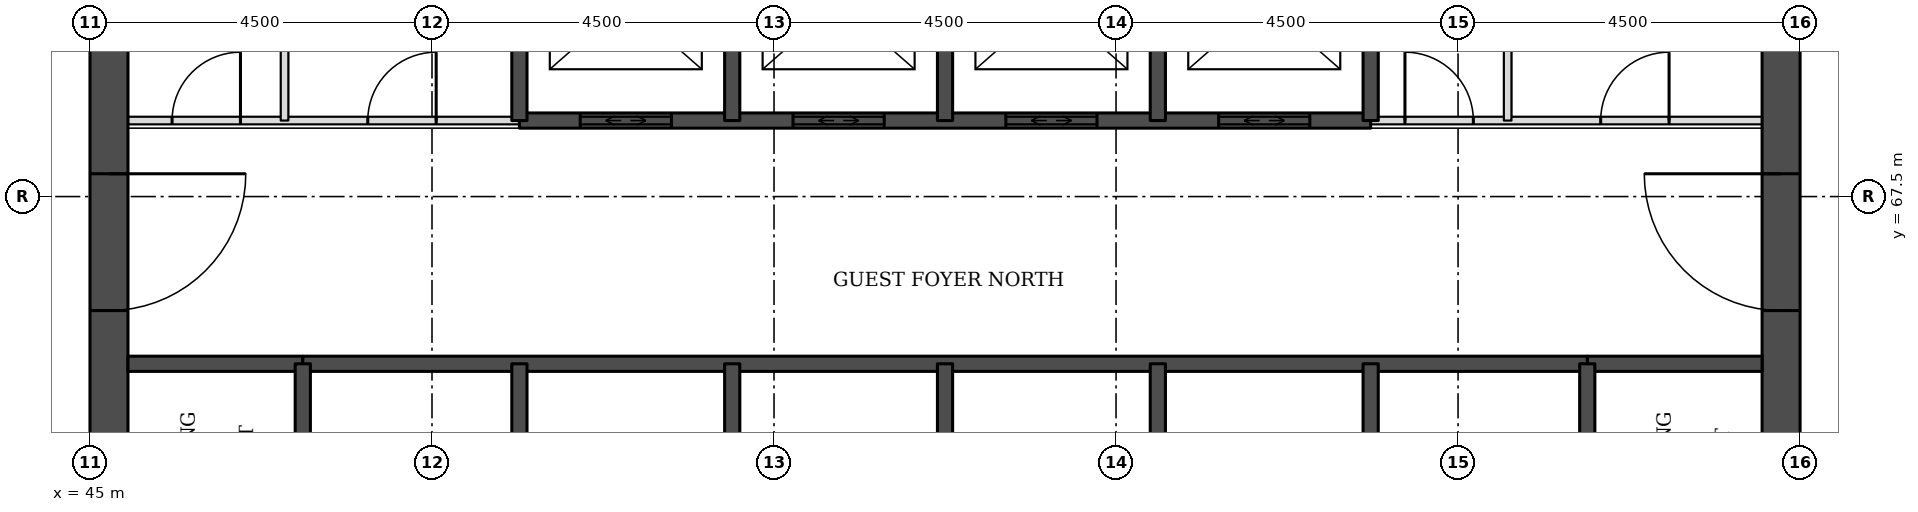
"""IFC4 building model, lengths in metres.
Left out: names, types, materials, properties, quantities, classifications, styles, units other than length and angle.
Written with IfcOpenShell. Run it as: python <this file> out.ifc"""

import sys

from ifc_helpers import new_model, si_unit, direction, frame, frame_2d, origin, place, context, subcontext, project, spatial, rectangle, extrude, element, fill, save


model = new_model("IFC4")
c1 = context("Model", 3, precision=1e-05, world=origin(), true_north=direction((0.0, 1.0)))
c2 = subcontext(c1, "Body", "Model", "MODEL_VIEW")
j1 = project(units=[si_unit("LENGTHUNIT", "METRE"), si_unit("PLANEANGLEUNIT", "RADIAN")], contexts=[c1])
p1 = place(None, origin())
s1 = spatial("IfcSite", under=j1, at=p1, CompositionType="ELEMENT")
p2 = place(p1, origin())
s2 = spatial("IfcBuilding", under=s1, at=p2, CompositionType="ELEMENT")
p3 = place(p2, frame((0.0, 0.0, 36.3)))
s3 = spatial("IfcBuildingStorey", under=s2, at=p3, CompositionType="ELEMENT", Elevation=36.3)
p4 = place(p3, frame((45.25, 49.5, 0.0), z_axis=(0.0, 0.0, 1.0), x_axis=(0.0, 1.0, 0.0)))
e1 = element("IfcWall", 1, at=p4, inside=s3, PredefinedType="SHEAR", context=c2, shape_type="SweptSolid", body=[
    extrude(rectangle(XDim=22.5, YDim=0.5, at=frame_2d((11.25, 0.0))), origin(), (0.0, 0.0, 1.0), 3.3),
])
p5 = place(p4, frame((4.2, 0.0, 0.0)))
e2 = element("IfcOpeningElement", 2, at=p5, cuts=e1, PredefinedType="OPENING", context=c2, shape_type="SweptSolid", body=[
    extrude(rectangle(XDim=1.8, YDim=2.1, at=frame_2d((0.9, 1.05))), frame((0.0, 0.26, 0.0), z_axis=(0.0, -1.0, 0.0), x_axis=(1.0, 0.0, 0.0)), (0.0, 0.0, 1.0), 0.52),
])
p6 = place(p4, frame((6.9, 0.0, 0.0)))
e3 = element("IfcOpeningElement", 3, at=p6, cuts=e1, PredefinedType="OPENING", context=c2, shape_type="SweptSolid", body=[
    extrude(rectangle(XDim=1.1, YDim=2.1, at=frame_2d((0.55, 1.05))), frame((0.0, 0.26, 0.0), z_axis=(0.0, -1.0, 0.0), x_axis=(1.0, 0.0, 0.0)), (0.0, 0.0, 1.0), 0.52),
])
p7 = place(p4, frame((13.6, 0.0, 0.0)))
e4 = element("IfcOpeningElement", 4, at=p7, cuts=e1, PredefinedType="OPENING", context=c2, shape_type="SweptSolid", body=[
    extrude(rectangle(XDim=1.1, YDim=2.1, at=frame_2d((0.55, 1.05))), frame((0.0, 0.26, 0.0), z_axis=(0.0, -1.0, 0.0), x_axis=(1.0, 0.0, 0.0)), (0.0, 0.0, 1.0), 0.52),
])
p8 = place(p4, frame((16.5, 0.0, 0.0)))
e5 = element("IfcOpeningElement", 5, at=p8, cuts=e1, PredefinedType="OPENING", context=c2, shape_type="SweptSolid", body=[
    extrude(rectangle(XDim=1.8, YDim=2.1, at=frame_2d((0.9, 1.05))), frame((0.0, 0.26, 0.0), z_axis=(0.0, -1.0, 0.0), x_axis=(1.0, 0.0, 0.0)), (0.0, 0.0, 1.0), 0.52),
])
p9 = place(p3, frame((67.25, 49.5, 0.0), z_axis=(0.0, 0.0, 1.0), x_axis=(0.0, 1.0, 0.0)))
e6 = element("IfcWall", 6, at=p9, inside=s3, PredefinedType="SHEAR", context=c2, shape_type="SweptSolid", body=[
    extrude(rectangle(XDim=22.5, YDim=0.5, at=frame_2d((11.25, 0.0))), origin(), (0.0, 0.0, 1.0), 3.3),
])
p10 = place(p9, frame((4.2, 0.0, 0.0)))
e7 = element("IfcOpeningElement", 7, at=p10, cuts=e6, PredefinedType="OPENING", context=c2, shape_type="SweptSolid", body=[
    extrude(rectangle(XDim=1.8, YDim=2.1, at=frame_2d((0.9, 1.05))), frame((0.0, 0.26, 0.0), z_axis=(0.0, -1.0, 0.0), x_axis=(1.0, 0.0, 0.0)), (0.0, 0.0, 1.0), 0.52),
])
p11 = place(p9, frame((6.9, 0.0, 0.0)))
e8 = element("IfcOpeningElement", 8, at=p11, cuts=e6, PredefinedType="OPENING", context=c2, shape_type="SweptSolid", body=[
    extrude(rectangle(XDim=1.1, YDim=2.1, at=frame_2d((0.55, 1.05))), frame((0.0, 0.26, 0.0), z_axis=(0.0, -1.0, 0.0), x_axis=(1.0, 0.0, 0.0)), (0.0, 0.0, 1.0), 0.52),
])
p12 = place(p9, frame((13.6, 0.0, 0.0)))
e9 = element("IfcOpeningElement", 9, at=p12, cuts=e6, PredefinedType="OPENING", context=c2, shape_type="SweptSolid", body=[
    extrude(rectangle(XDim=1.1, YDim=2.1, at=frame_2d((0.55, 1.05))), frame((0.0, 0.26, 0.0), z_axis=(0.0, -1.0, 0.0), x_axis=(1.0, 0.0, 0.0)), (0.0, 0.0, 1.0), 0.52),
])
p13 = place(p9, frame((16.5, 0.0, 0.0)))
e10 = element("IfcOpeningElement", 10, at=p13, cuts=e6, PredefinedType="OPENING", context=c2, shape_type="SweptSolid", body=[
    extrude(rectangle(XDim=1.8, YDim=2.1, at=frame_2d((0.9, 1.05))), frame((0.0, 0.26, 0.0), z_axis=(0.0, -1.0, 0.0), x_axis=(1.0, 0.0, 0.0)), (0.0, 0.0, 1.0), 0.52),
])
for number, where, z_axis, x_axis in (
    (11, (45.5, 65.3, 0.0), (0.0, 0.0, 1.0), (1.0, 0.0, 0.0)),
    (12, (64.7, 65.3, 0.0), (0.0, 0.0, 1.0), (1.0, 0.0, 0.0)),
):
    element("IfcWall", number, at=place(p3, frame(where, z_axis=z_axis, x_axis=x_axis)), inside=s3, PredefinedType="SOLIDWALL", context=c2, shape_type="SweptSolid", body=[
        extrude(rectangle(XDim=2.3, YDim=0.2, at=frame_2d((1.15, 0.0))), origin(), (0.0, 0.0, 1.0), 3.08),
    ])
p14 = place(p3, frame((47.8, 65.3, 0.0), z_axis=(0.0, 0.0, 1.0), x_axis=(1.0, 0.0, 0.0)))
e13 = element("IfcWall", 13, at=p14, inside=s3, PredefinedType="SOLIDWALL", context=c2, shape_type="SweptSolid", body=[
    extrude(rectangle(XDim=16.9, YDim=0.2, at=frame_2d((8.45, 0.0))), origin(), (0.0, 0.0, 1.0), 3.08),
])
p15 = place(p3, frame((45.5, 68.5, 0.0), z_axis=(0.0, 0.0, 1.0), x_axis=(1.0, 0.0, 0.0)))
e14 = element("IfcWall", 14, at=p15, inside=s3, PredefinedType="PARTITIONING", context=c2, shape_type="SweptSolid", body=[
    extrude(rectangle(XDim=5.15, YDim=0.1, at=frame_2d((2.575, 0.0))), origin(), (0.0, 0.0, 1.0), 3.08),
])
p16 = place(p15, frame((0.58, 0.0, 0.0)))
e15 = element("IfcOpeningElement", 15, at=p16, cuts=e14, PredefinedType="OPENING", context=c2, shape_type="SweptSolid", body=[
    extrude(rectangle(XDim=0.9, YDim=2.1, at=frame_2d((0.45, 1.05))), frame((0.0, 0.06, 0.0), z_axis=(0.0, -1.0, 0.0), x_axis=(1.0, 0.0, 0.0)), (0.0, 0.0, 1.0), 0.12),
])
p17 = place(p15, frame((3.155, 0.0, 0.0)))
e16 = element("IfcOpeningElement", 16, at=p17, cuts=e14, PredefinedType="OPENING", context=c2, shape_type="SweptSolid", body=[
    extrude(rectangle(XDim=0.9, YDim=2.1, at=frame_2d((0.45, 1.05))), frame((0.0, 0.06, 0.0), z_axis=(0.0, -1.0, 0.0), x_axis=(1.0, 0.0, 0.0)), (0.0, 0.0, 1.0), 0.12),
])
p18 = place(p3, frame((61.85, 68.5, 0.0), z_axis=(0.0, 0.0, 1.0), x_axis=(1.0, 0.0, 0.0)))
e17 = element("IfcWall", 17, at=p18, inside=s3, PredefinedType="PARTITIONING", context=c2, shape_type="SweptSolid", body=[
    extrude(rectangle(XDim=5.15, YDim=0.1, at=frame_2d((2.575, 0.0))), origin(), (0.0, 0.0, 1.0), 3.08),
])
p19 = place(p18, frame((3.026, 0.0, 0.0)))
e18 = element("IfcOpeningElement", 18, at=p19, cuts=e17, PredefinedType="OPENING", context=c2, shape_type="SweptSolid", body=[
    extrude(rectangle(XDim=0.9, YDim=2.1, at=frame_2d((0.45, 1.05))), frame((0.0, 0.06, 0.0), z_axis=(0.0, -1.0, 0.0), x_axis=(1.0, 0.0, 0.0)), (0.0, 0.0, 1.0), 0.12),
])
p20 = place(p18, frame((0.451, 0.0, 0.0)))
e19 = element("IfcOpeningElement", 19, at=p20, cuts=e17, PredefinedType="OPENING", context=c2, shape_type="SweptSolid", body=[
    extrude(rectangle(XDim=0.9, YDim=2.1, at=frame_2d((0.45, 1.05))), frame((0.0, 0.06, 0.0), z_axis=(0.0, -1.0, 0.0), x_axis=(1.0, 0.0, 0.0)), (0.0, 0.0, 1.0), 0.12),
])
p21 = place(p3, frame((50.65, 68.5, 0.0), z_axis=(0.0, 0.0, 1.0), x_axis=(1.0, 0.0, 0.0)))
e20 = element("IfcWall", 20, at=p21, inside=s3, PredefinedType="SOLIDWALL", context=c2, shape_type="SweptSolid", body=[
    extrude(rectangle(XDim=11.2, YDim=0.2, at=frame_2d((5.6, 0.0))), origin(), (0.0, 0.0, 1.0), 3.08),
])
p22 = place(p21, frame((0.8, 0.0, 0.0)))
e21 = element("IfcOpeningElement", 21, at=p22, cuts=e20, PredefinedType="OPENING", context=c2, shape_type="SweptSolid", body=[
    extrude(rectangle(XDim=1.2, YDim=2.1, at=frame_2d((0.6, 1.05))), frame((0.0, 0.11, 0.0), z_axis=(0.0, -1.0, 0.0), x_axis=(1.0, 0.0, 0.0)), (0.0, 0.0, 1.0), 0.22),
])
p23 = place(p21, frame((3.6, 0.0, 0.0)))
e22 = element("IfcOpeningElement", 22, at=p23, cuts=e20, PredefinedType="OPENING", context=c2, shape_type="SweptSolid", body=[
    extrude(rectangle(XDim=1.2, YDim=2.1, at=frame_2d((0.6, 1.05))), frame((0.0, 0.11, 0.0), z_axis=(0.0, -1.0, 0.0), x_axis=(1.0, 0.0, 0.0)), (0.0, 0.0, 1.0), 0.22),
])
p24 = place(p21, frame((6.4, 0.0, 0.0)))
e23 = element("IfcOpeningElement", 23, at=p24, cuts=e20, PredefinedType="OPENING", context=c2, shape_type="SweptSolid", body=[
    extrude(rectangle(XDim=1.2, YDim=2.1, at=frame_2d((0.6, 1.05))), frame((0.0, 0.11, 0.0), z_axis=(0.0, -1.0, 0.0), x_axis=(1.0, 0.0, 0.0)), (0.0, 0.0, 1.0), 0.22),
])
p25 = place(p21, frame((9.2, 0.0, 0.0)))
e24 = element("IfcOpeningElement", 24, at=p25, cuts=e20, PredefinedType="OPENING", context=c2, shape_type="SweptSolid", body=[
    extrude(rectangle(XDim=1.2, YDim=2.1, at=frame_2d((0.6, 1.05))), frame((0.0, 0.11, 0.0), z_axis=(0.0, -1.0, 0.0), x_axis=(1.0, 0.0, 0.0)), (0.0, 0.0, 1.0), 0.22),
])
p26 = place(p3, frame((47.56, 68.5, 0.0), z_axis=(0.0, 0.0, 1.0), x_axis=(0.0, 1.0, 0.0)))
e25 = element("IfcWall", 25, at=p26, inside=s3, PredefinedType="PARTITIONING", context=c2, shape_type="SweptSolid", body=[
    extrude(rectangle(XDim=3.0, YDim=0.1, at=frame_2d((1.5, 0.0))), origin(), (0.0, 0.0, 1.0), 3.08),
])
p27 = place(p3, frame((47.8, 62.0, 0.0), z_axis=(0.0, 0.0, 1.0), x_axis=(0.0, 1.0, 0.0)))
e26 = element("IfcWall", 26, at=p27, inside=s3, PredefinedType="SOLIDWALL", context=c2, shape_type="SweptSolid", body=[
    extrude(rectangle(XDim=3.3, YDim=0.2, at=frame_2d((1.65, 0.0))), origin(), (0.0, 0.0, 1.0), 3.08),
])
p28 = place(p27, frame((1.1, 0.0, 0.0)))
e27 = element("IfcOpeningElement", 27, at=p28, cuts=e26, PredefinedType="OPENING", context=c2, shape_type="SweptSolid", body=[
    extrude(rectangle(XDim=1.1, YDim=2.1, at=frame_2d((0.55, 1.05))), frame((0.0, 0.11, 0.0), z_axis=(0.0, -1.0, 0.0), x_axis=(1.0, 0.0, 0.0)), (0.0, 0.0, 1.0), 0.22),
])
p29 = place(p3, frame((50.65, 62.0, 0.0), z_axis=(0.0, 0.0, 1.0), x_axis=(0.0, 1.0, 0.0)))
e28 = element("IfcWall", 28, at=p29, inside=s3, PredefinedType="SOLIDWALL", context=c2, shape_type="SweptSolid", body=[
    extrude(rectangle(XDim=3.3, YDim=0.2, at=frame_2d((1.65, 0.0))), origin(), (0.0, 0.0, 1.0), 3.08),
])
p30 = place(p3, frame((50.65, 68.5, 0.0), z_axis=(0.0, 0.0, 1.0), x_axis=(0.0, 1.0, 0.0)))
e29 = element("IfcWall", 29, at=p30, inside=s3, PredefinedType="SOLIDWALL", context=c2, shape_type="SweptSolid", body=[
    extrude(rectangle(XDim=3.0, YDim=0.2, at=frame_2d((1.5, 0.0))), origin(), (0.0, 0.0, 1.0), 3.08),
])
p31 = place(p3, frame((53.45, 62.5, 0.0), z_axis=(0.0, 0.0, 1.0), x_axis=(0.0, 1.0, 0.0)))
e30 = element("IfcWall", 30, at=p31, inside=s3, PredefinedType="SOLIDWALL", context=c2, shape_type="SweptSolid", body=[
    extrude(rectangle(XDim=2.8, YDim=0.2, at=frame_2d((1.4, 0.0))), origin(), (0.0, 0.0, 1.0), 3.08),
])
p32 = place(p3, frame((53.45, 68.5, 0.0), z_axis=(0.0, 0.0, 1.0), x_axis=(0.0, 1.0, 0.0)))
e31 = element("IfcWall", 31, at=p32, inside=s3, PredefinedType="SOLIDWALL", context=c2, shape_type="SweptSolid", body=[
    extrude(rectangle(XDim=3.0, YDim=0.2, at=frame_2d((1.5, 0.0))), origin(), (0.0, 0.0, 1.0), 3.08),
])
p33 = place(p3, frame((56.25, 62.5, 0.0), z_axis=(0.0, 0.0, 1.0), x_axis=(0.0, 1.0, 0.0)))
e32 = element("IfcWall", 32, at=p33, inside=s3, PredefinedType="SOLIDWALL", context=c2, shape_type="SweptSolid", body=[
    extrude(rectangle(XDim=2.8, YDim=0.2, at=frame_2d((1.4, 0.0))), origin(), (0.0, 0.0, 1.0), 3.08),
])
p34 = place(p3, frame((56.25, 68.5, 0.0), z_axis=(0.0, 0.0, 1.0), x_axis=(0.0, 1.0, 0.0)))
e33 = element("IfcWall", 33, at=p34, inside=s3, PredefinedType="SOLIDWALL", context=c2, shape_type="SweptSolid", body=[
    extrude(rectangle(XDim=3.0, YDim=0.2, at=frame_2d((1.5, 0.0))), origin(), (0.0, 0.0, 1.0), 3.08),
])
p35 = place(p3, frame((59.05, 62.5, 0.0), z_axis=(0.0, 0.0, 1.0), x_axis=(0.0, 1.0, 0.0)))
e34 = element("IfcWall", 34, at=p35, inside=s3, PredefinedType="SOLIDWALL", context=c2, shape_type="SweptSolid", body=[
    extrude(rectangle(XDim=2.8, YDim=0.2, at=frame_2d((1.4, 0.0))), origin(), (0.0, 0.0, 1.0), 3.08),
])
p36 = place(p3, frame((59.05, 68.5, 0.0), z_axis=(0.0, 0.0, 1.0), x_axis=(0.0, 1.0, 0.0)))
e35 = element("IfcWall", 35, at=p36, inside=s3, PredefinedType="SOLIDWALL", context=c2, shape_type="SweptSolid", body=[
    extrude(rectangle(XDim=3.0, YDim=0.2, at=frame_2d((1.5, 0.0))), origin(), (0.0, 0.0, 1.0), 3.08),
])
p37 = place(p3, frame((61.85, 62.0, 0.0), z_axis=(0.0, 0.0, 1.0), x_axis=(0.0, 1.0, 0.0)))
e36 = element("IfcWall", 36, at=p37, inside=s3, PredefinedType="SOLIDWALL", context=c2, shape_type="SweptSolid", body=[
    extrude(rectangle(XDim=3.3, YDim=0.2, at=frame_2d((1.65, 0.0))), origin(), (0.0, 0.0, 1.0), 3.08),
])
p38 = place(p3, frame((61.85, 68.5, 0.0), z_axis=(0.0, 0.0, 1.0), x_axis=(0.0, 1.0, 0.0)))
e37 = element("IfcWall", 37, at=p38, inside=s3, PredefinedType="SOLIDWALL", context=c2, shape_type="SweptSolid", body=[
    extrude(rectangle(XDim=3.0, YDim=0.2, at=frame_2d((1.5, 0.0))), origin(), (0.0, 0.0, 1.0), 3.08),
])
p39 = place(p3, frame((63.653, 68.5, 0.0), z_axis=(0.0, 0.0, 1.0), x_axis=(0.0, 1.0, 0.0)))
e38 = element("IfcWall", 38, at=p39, inside=s3, PredefinedType="PARTITIONING", context=c2, shape_type="SweptSolid", body=[
    extrude(rectangle(XDim=3.0, YDim=0.1, at=frame_2d((1.5, 0.0))), origin(), (0.0, 0.0, 1.0), 3.08),
])
p40 = place(p3, frame((64.7, 62.0, 0.0), z_axis=(0.0, 0.0, 1.0), x_axis=(0.0, 1.0, 0.0)))
e39 = element("IfcWall", 39, at=p40, inside=s3, PredefinedType="SOLIDWALL", context=c2, shape_type="SweptSolid", body=[
    extrude(rectangle(XDim=3.3, YDim=0.2, at=frame_2d((1.65, 0.0))), origin(), (0.0, 0.0, 1.0), 3.08),
])
p41 = place(p40, frame((1.1, 0.0, 0.0)))
e40 = element("IfcOpeningElement", 40, at=p41, cuts=e39, PredefinedType="OPENING", context=c2, shape_type="SweptSolid", body=[
    extrude(rectangle(XDim=1.1, YDim=2.1, at=frame_2d((0.55, 1.05))), frame((0.0, 0.11, 0.0), z_axis=(0.0, -1.0, 0.0), x_axis=(1.0, 0.0, 0.0)), (0.0, 0.0, 1.0), 0.22),
])
p42 = place(p22, origin())
e41 = element("IfcDoor", 41, at=p42, inside=s3, OperationType="DOUBLE_DOOR_SLIDING", PredefinedType="DOOR", context=c2, shape_type="SweptSolid", body=[
    extrude(rectangle(XDim=1.2, YDim=2.1, at=frame_2d((0.6, 1.05))), frame((0.0, 0.025, 0.0), z_axis=(0.0, -1.0, 0.0), x_axis=(1.0, 0.0, 0.0)), (0.0, 0.0, 1.0), 0.05),
])
fill(e21, e41)
p43 = place(p23, origin())
e42 = element("IfcDoor", 42, at=p43, inside=s3, OperationType="DOUBLE_DOOR_SLIDING", PredefinedType="DOOR", context=c2, shape_type="SweptSolid", body=[
    extrude(rectangle(XDim=1.2, YDim=2.1, at=frame_2d((0.6, 1.05))), frame((0.0, 0.025, 0.0), z_axis=(0.0, -1.0, 0.0), x_axis=(1.0, 0.0, 0.0)), (0.0, 0.0, 1.0), 0.05),
])
fill(e22, e42)
p44 = place(p24, origin())
e43 = element("IfcDoor", 43, at=p44, inside=s3, OperationType="DOUBLE_DOOR_SLIDING", PredefinedType="DOOR", context=c2, shape_type="SweptSolid", body=[
    extrude(rectangle(XDim=1.2, YDim=2.1, at=frame_2d((0.6, 1.05))), frame((0.0, 0.025, 0.0), z_axis=(0.0, -1.0, 0.0), x_axis=(1.0, 0.0, 0.0)), (0.0, 0.0, 1.0), 0.05),
])
fill(e23, e43)
p45 = place(p25, origin())
e44 = element("IfcDoor", 44, at=p45, inside=s3, OperationType="DOUBLE_DOOR_SLIDING", PredefinedType="DOOR", context=c2, shape_type="SweptSolid", body=[
    extrude(rectangle(XDim=1.2, YDim=2.1, at=frame_2d((0.6, 1.05))), frame((0.0, 0.025, 0.0), z_axis=(0.0, -1.0, 0.0), x_axis=(1.0, 0.0, 0.0)), (0.0, 0.0, 1.0), 0.05),
])
fill(e24, e44)
p46 = place(p8, frame((1.8, 0.0, 0.0), z_axis=(0.0, 0.0, 1.0), x_axis=(-1.0, 0.0, 0.0)))
e45 = element("IfcDoor", 45, at=p46, inside=s3, OperationType="SINGLE_SWING_LEFT", PredefinedType="DOOR", context=c2, shape_type="SweptSolid", body=[
    extrude(rectangle(XDim=1.8, YDim=2.1, at=frame_2d((0.9, 1.05))), frame((0.0, 0.025, 0.0), z_axis=(0.0, -1.0, 0.0), x_axis=(1.0, 0.0, 0.0)), (0.0, 0.0, 1.0), 0.05),
])
fill(e5, e45)
p47 = place(p13, origin())
e46 = element("IfcDoor", 46, at=p47, inside=s3, OperationType="SINGLE_SWING_RIGHT", PredefinedType="DOOR", context=c2, shape_type="SweptSolid", body=[
    extrude(rectangle(XDim=1.8, YDim=2.1, at=frame_2d((0.9, 1.05))), frame((0.0, 0.025, 0.0), z_axis=(0.0, -1.0, 0.0), x_axis=(1.0, 0.0, 0.0)), (0.0, 0.0, 1.0), 0.05),
])
fill(e10, e46)
p48 = place(p19, origin())
e47 = element("IfcDoor", 47, at=p48, inside=s3, OperationType="SINGLE_SWING_RIGHT", PredefinedType="DOOR", context=c2, shape_type="SweptSolid", body=[
    extrude(rectangle(XDim=0.9, YDim=2.1, at=frame_2d((0.45, 1.05))), frame((0.0, 0.025, 0.0), z_axis=(0.0, -1.0, 0.0), x_axis=(1.0, 0.0, 0.0)), (0.0, 0.0, 1.0), 0.05),
])
fill(e18, e47)
p49 = place(p20, origin())
e48 = element("IfcDoor", 48, at=p49, inside=s3, OperationType="SINGLE_SWING_LEFT", PredefinedType="DOOR", context=c2, shape_type="SweptSolid", body=[
    extrude(rectangle(XDim=0.9, YDim=2.1, at=frame_2d((0.45, 1.05))), frame((0.0, 0.025, 0.0), z_axis=(0.0, -1.0, 0.0), x_axis=(1.0, 0.0, 0.0)), (0.0, 0.0, 1.0), 0.05),
])
fill(e19, e48)
p50 = place(p16, origin())
e49 = element("IfcDoor", 49, at=p50, inside=s3, OperationType="SINGLE_SWING_RIGHT", PredefinedType="DOOR", context=c2, shape_type="SweptSolid", body=[
    extrude(rectangle(XDim=0.9, YDim=2.1, at=frame_2d((0.45, 1.05))), frame((0.0, 0.025, 0.0), z_axis=(0.0, -1.0, 0.0), x_axis=(1.0, 0.0, 0.0)), (0.0, 0.0, 1.0), 0.05),
])
fill(e15, e49)
p51 = place(p17, origin())
e50 = element("IfcDoor", 50, at=p51, inside=s3, OperationType="SINGLE_SWING_RIGHT", PredefinedType="DOOR", context=c2, shape_type="SweptSolid", body=[
    extrude(rectangle(XDim=0.9, YDim=2.1, at=frame_2d((0.45, 1.05))), frame((0.0, 0.025, 0.0), z_axis=(0.0, -1.0, 0.0), x_axis=(1.0, 0.0, 0.0)), (0.0, 0.0, 1.0), 0.05),
])
fill(e16, e50)
save(model, sys.argv[1])
